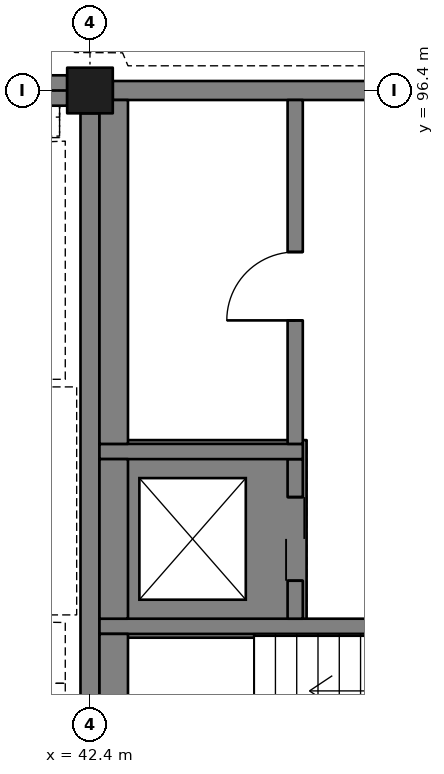
"""IFC4 building model, lengths in metres.
Left out: names, types, materials, properties, quantities, classifications, styles, units other than length and angle.
Written with IfcOpenShell. Run it as: python <this file> out.ifc"""

import sys

from ifc_helpers import new_model, si_unit, direction, frame, frame_2d, origin, origin_2d, place, context, subcontext, project, spatial, polyline, rectangle, outline, extrude, element, fill, save


model = new_model("IFC4")
c1 = context("Model", 3, precision=1e-05, world=origin(), true_north=direction((0.0, 1.0)))
c2 = subcontext(c1, "Body", "Model", "MODEL_VIEW")
j1 = project(units=[si_unit("LENGTHUNIT", "METRE"), si_unit("PLANEANGLEUNIT", "RADIAN")], contexts=[c1])
p1 = place(None, origin())
s1 = spatial("IfcSite", under=j1, at=p1, CompositionType="ELEMENT")
p2 = place(p1, origin())
s2 = spatial("IfcBuilding", under=s1, at=p2, CompositionType="ELEMENT")
p3 = place(p2, origin())
s3 = spatial("IfcBuildingStorey", under=s2, at=p3, CompositionType="ELEMENT", Elevation=0.0)
p4 = place(p3, frame((42.4, 96.4, -1.8), z_axis=(0.0, 0.0, 1.0), x_axis=(1.0, 0.0, 0.0)))
e1 = element("IfcColumn", 1, at=p4, inside=s3, PredefinedType="COLUMN", context=c2, shape_type="SweptSolid", body=[
    extrude(rectangle(XDim=0.6, YDim=0.6, at=origin_2d()), origin(), (0.0, 0.0, 1.0), 6.6),
])
p5 = place(p3, frame((0.0, 0.0, -1.4)))
e2 = element("IfcWall", 2, at=p5, inside=s3, PredefinedType="SOLIDWALL", context=c2, shape_type="SweptSolid", body=[
    extrude(outline(polyline([(45.25, 89.2), (45.25, 91.8), (42.65, 91.8), (42.65, 89.2), (45.25, 89.2)]), holes=[polyline([(45.0, 91.55), (42.9, 91.55), (42.9, 89.45), (45.0, 89.45), (45.0, 91.55)])]), origin(), (0.0, 0.0, 1.0), 1.4),
])
p6 = place(p3, frame((52.9, 96.4, 0.0), z_axis=(0.0, 0.0, 1.0), x_axis=(-1.0, 0.0, 0.0)))
e3 = element("IfcWall", 3, at=p6, inside=s3, PredefinedType="SOLIDWALL", context=c2, shape_type="SweptSolid", body=[
    extrude(rectangle(XDim=10.2, YDim=0.25, at=frame_2d((5.1, 0.0))), origin(), (0.0, 0.0, 1.0), 4.8),
])
p7 = place(p3, frame((42.4, 96.1, 0.0), z_axis=(0.0, 0.0, 1.0), x_axis=(0.0, -1.0, 0.0)))
e4 = element("IfcWall", 4, at=p7, inside=s3, PredefinedType="SOLIDWALL", context=c2, shape_type="SweptSolid", body=[
    extrude(rectangle(XDim=10.2, YDim=0.25, at=frame_2d((5.1, 0.0))), origin(), (0.0, 0.0, 1.0), 4.8),
])
p8 = place(p3, frame((49.9, 89.35, 0.0), z_axis=(0.0, 0.0, 1.0), x_axis=(-1.0, 0.0, 0.0)))
e5 = element("IfcWall", 5, at=p8, inside=s3, PredefinedType="SOLIDWALL", context=c2, shape_type="SweptSolid", body=[
    extrude(rectangle(XDim=7.375, YDim=0.2, at=frame_2d((3.688, 0.0))), origin(), (0.0, 0.0, 1.0), 4.4),
])
p9 = place(p3, frame((45.1, 89.45, 0.0), z_axis=(0.0, 0.0, 1.0), x_axis=(0.0, 1.0, 0.0)))
e6 = element("IfcWall", 6, at=p9, inside=s3, PredefinedType="SOLIDWALL", context=c2, shape_type="SweptSolid", body=[
    extrude(rectangle(XDim=2.1, YDim=0.2, at=frame_2d((1.05, 0.0))), origin(), (0.0, 0.0, 1.0), 4.4),
])
p10 = place(p9, frame((0.5, 0.0, 0.0)))
e7 = element("IfcOpeningElement", 7, at=p10, cuts=e6, PredefinedType="OPENING", context=c2, shape_type="SweptSolid", body=[
    extrude(rectangle(XDim=1.1, YDim=2.1, at=frame_2d((0.55, 1.05))), frame((0.0, 0.11, 0.0), z_axis=(0.0, -1.0, 0.0), x_axis=(1.0, 0.0, 0.0)), (0.0, 0.0, 1.0), 0.22),
])
p11 = place(p3, frame((45.2, 91.65, 0.0), z_axis=(0.0, 0.0, 1.0), x_axis=(-1.0, 0.0, 0.0)))
e8 = element("IfcWall", 8, at=p11, inside=s3, PredefinedType="SOLIDWALL", context=c2, shape_type="SweptSolid", body=[
    extrude(rectangle(XDim=2.675, YDim=0.2, at=frame_2d((1.337, 0.0))), origin(), (0.0, 0.0, 1.0), 4.4),
])
p12 = place(p3, frame((45.1, 91.75, 0.0), z_axis=(0.0, 0.0, 1.0), x_axis=(0.0, 1.0, 0.0)))
e9 = element("IfcWall", 9, at=p12, inside=s3, PredefinedType="SOLIDWALL", context=c2, shape_type="SweptSolid", body=[
    extrude(rectangle(XDim=4.525, YDim=0.2, at=frame_2d((2.262, 0.0))), origin(), (0.0, 0.0, 1.0), 4.4),
])
p13 = place(p12, frame((1.625, 0.0, 0.0)))
e10 = element("IfcOpeningElement", 10, at=p13, cuts=e9, PredefinedType="OPENING", context=c2, shape_type="SweptSolid", body=[
    extrude(rectangle(XDim=0.9, YDim=2.1, at=frame_2d((0.45, 1.05))), frame((0.0, 0.11, 0.0), z_axis=(0.0, -1.0, 0.0), x_axis=(1.0, 0.0, 0.0)), (0.0, 0.0, 1.0), 0.22),
])
p14 = place(p3, frame((42.712, 85.725, 0.0), z_axis=(0.0, 0.0, 1.0), x_axis=(0.0, 1.0, 0.0)))
e11 = element("IfcWall", 11, at=p14, inside=s3, PredefinedType="SOLIDWALL", context=c2, shape_type="SweptSolid", body=[
    extrude(rectangle(XDim=3.525, YDim=0.375, at=frame_2d((1.762, 0.0))), origin(), (0.0, 0.0, 1.0), 4.4),
])
p15 = place(p3, frame((42.712, 89.45, 0.0), z_axis=(0.0, 0.0, 1.0), x_axis=(0.0, 1.0, 0.0)))
e12 = element("IfcWall", 12, at=p15, inside=s3, PredefinedType="SOLIDWALL", context=c2, shape_type="SweptSolid", body=[
    extrude(rectangle(XDim=2.1, YDim=0.375, at=frame_2d((1.05, 0.0))), origin(), (0.0, 0.0, 1.0), 4.4),
])
p16 = place(p3, frame((42.712, 91.75, 0.0), z_axis=(0.0, 0.0, 1.0), x_axis=(0.0, 1.0, 0.0)))
e13 = element("IfcWall", 13, at=p16, inside=s3, PredefinedType="SOLIDWALL", context=c2, shape_type="SweptSolid", body=[
    extrude(rectangle(XDim=4.525, YDim=0.375, at=frame_2d((2.262, 0.0))), origin(), (0.0, 0.0, 1.0), 4.4),
])
p17 = place(p3, frame((31.4, 96.4, 0.0), z_axis=(0.0, 0.0, 1.0), x_axis=(1.0, 0.0, 0.0)))
e14 = element("IfcWall", 14, at=p17, inside=s3, PredefinedType="SOLIDWALL", context=c2, shape_type="SweptSolid", body=[
    extrude(rectangle(XDim=10.7, YDim=0.4, at=frame_2d((5.35, 0.0))), origin(), (0.0, 0.0, 1.0), 1.6),
])
p18 = place(p10, frame((1.1, 0.0, 0.0), z_axis=(0.0, 0.0, 1.0), x_axis=(-1.0, 0.0, 0.0)))
e15 = element("IfcDoor", 15, at=p18, inside=s3, OperationType="DOUBLE_DOOR_SLIDING", PredefinedType="DOOR", context=c2, shape_type="SweptSolid", body=[
    extrude(rectangle(XDim=1.1, YDim=2.1, at=frame_2d((0.55, 1.05))), frame((0.0, 0.025, 0.0), z_axis=(0.0, -1.0, 0.0), x_axis=(1.0, 0.0, 0.0)), (0.0, 0.0, 1.0), 0.05),
])
fill(e7, e15)
p19 = place(p13, frame((0.9, 0.0, 0.0), z_axis=(0.0, 0.0, 1.0), x_axis=(-1.0, 0.0, 0.0)))
e16 = element("IfcDoor", 16, at=p19, inside=s3, OperationType="SINGLE_SWING_RIGHT", PredefinedType="DOOR", context=c2, shape_type="SweptSolid", body=[
    extrude(rectangle(XDim=0.9, YDim=2.1, at=frame_2d((0.45, 1.05))), frame((0.0, 0.025, 0.0), z_axis=(0.0, -1.0, 0.0), x_axis=(1.0, 0.0, 0.0)), (0.0, 0.0, 1.0), 0.05),
])
fill(e10, e16)
save(model, sys.argv[1])
